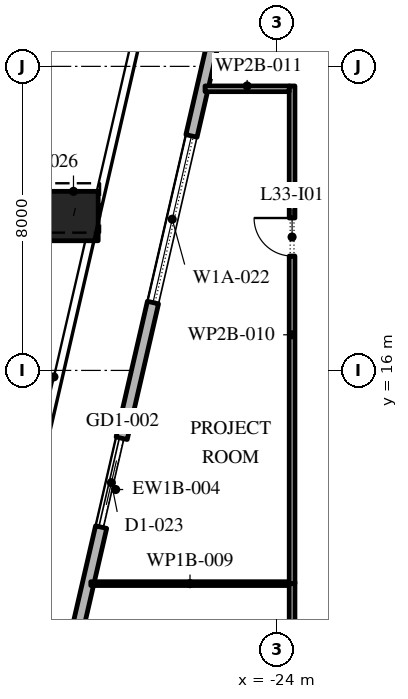
"""IFC4 building model, lengths in metres.
Left out: names, types, materials, properties, quantities, classifications, styles, units other than length and angle.
Written with IfcOpenShell. Run it as: python <this file> out.ifc"""

import sys

from ifc_helpers import new_model, si_unit, direction, frame, frame_2d, origin, origin_2d, place, context, subcontext, project, spatial, rectangle, extrude, element, fill, save


model = new_model("IFC4")
c1 = context("Model", 3, precision=1e-05, world=origin(), true_north=direction((0.0, 1.0)))
c2 = subcontext(c1, "Body", "Model", "MODEL_VIEW")
j1 = project(units=[si_unit("LENGTHUNIT", "METRE"), si_unit("PLANEANGLEUNIT", "RADIAN")], contexts=[c1])
p1 = place(None, origin())
s1 = spatial("IfcSite", under=j1, at=p1, CompositionType="ELEMENT")
p2 = place(p1, origin())
s2 = spatial("IfcBuilding", under=s1, at=p2, CompositionType="ELEMENT")
p3 = place(p2, frame((0.0, 0.0, 151.8)))
s3 = spatial("IfcBuildingStorey", under=s2, at=p3, CompositionType="ELEMENT", Elevation=151.8)
p4 = place(p3, frame((-29.352, 20.062, 0.0), z_axis=(0.011668301382, 0.050504588071, 0.998655665045), x_axis=(-0.974334539389, 0.225104876342, 0.0)))
e1 = element("IfcColumn", 1, at=p4, inside=s3, PredefinedType="COLUMN", context=c2, shape_type="SweptSolid", body=[
    extrude(rectangle(XDim=1.3, YDim=1.3, at=origin_2d()), origin(), (0.0, 0.0, 1.0), 4.206),
])
p5 = place(p3, frame((-22.82, 37.016, 0.0), z_axis=(0.0, 0.0, 1.0), x_axis=(-0.224953880882, -0.974369412223, 0.0)))
e2 = element("IfcWall", 2, at=p5, inside=s3, PredefinedType="STANDARD", context=c2, shape_type="SweptSolid", body=[
    extrude(rectangle(XDim=49.5, YDim=0.3, at=frame_2d((24.75, 0.0))), origin(), (0.0, 0.0, 1.0), 3.95),
])
p6 = place(p5, frame((1.157, 0.0, 0.45)))
e3 = element("IfcOpeningElement", 3, at=p6, cuts=e2, PredefinedType="OPENING", context=c2, shape_type="SweptSolid", body=[
    extrude(rectangle(XDim=4.5, YDim=3.05, at=frame_2d((2.25, 1.525))), frame((0.0, 0.16, 0.0), z_axis=(0.0, -1.0, 0.0), x_axis=(1.0, 0.0, 0.0)), (0.0, 0.0, 1.0), 0.32),
])
p7 = place(p5, frame((8.121, 0.0, 0.45)))
e4 = element("IfcOpeningElement", 4, at=p7, cuts=e2, PredefinedType="OPENING", context=c2, shape_type="SweptSolid", body=[
    extrude(rectangle(XDim=4.5, YDim=3.0, at=frame_2d((2.25, 1.5))), frame((0.0, 0.16, 0.0), z_axis=(0.0, -1.0, 0.0), x_axis=(1.0, 0.0, 0.0)), (0.0, 0.0, 1.0), 0.32),
])
p8 = place(p5, frame((15.236, 0.0, 0.45)))
e5 = element("IfcOpeningElement", 5, at=p8, cuts=e2, PredefinedType="OPENING", context=c2, shape_type="SweptSolid", body=[
    extrude(rectangle(XDim=4.5, YDim=3.0, at=frame_2d((2.25, 1.5))), frame((0.0, 0.16, 0.0), z_axis=(0.0, -1.0, 0.0), x_axis=(1.0, 0.0, 0.0)), (0.0, 0.0, 1.0), 0.32),
])
p9 = place(p5, frame((23.4, 0.0, 0.0)))
e6 = element("IfcOpeningElement", 6, at=p9, cuts=e2, PredefinedType="OPENING", context=c2, shape_type="SweptSolid", body=[
    extrude(rectangle(XDim=2.4, YDim=3.5, at=frame_2d((1.2, 1.75))), frame((0.0, 0.16, 0.0), z_axis=(0.0, -1.0, 0.0), x_axis=(1.0, 0.0, 0.0)), (0.0, 0.0, 1.0), 0.32),
])
p10 = place(p5, frame((29.464, 0.0, 0.45)))
e7 = element("IfcOpeningElement", 7, at=p10, cuts=e2, PredefinedType="OPENING", context=c2, shape_type="SweptSolid", body=[
    extrude(rectangle(XDim=4.5, YDim=2.825, at=frame_2d((2.25, 1.413))), frame((0.0, 0.16, 0.0), z_axis=(0.0, -1.0, 0.0), x_axis=(1.0, 0.0, 0.0)), (0.0, 0.0, 1.0), 0.32),
])
p11 = place(p5, frame((36.579, 0.0, 0.45)))
e8 = element("IfcOpeningElement", 8, at=p11, cuts=e2, PredefinedType="OPENING", context=c2, shape_type="SweptSolid", body=[
    extrude(rectangle(XDim=4.5, YDim=2.625, at=frame_2d((2.25, 1.312))), frame((0.0, 0.16, 0.0), z_axis=(0.0, -1.0, 0.0), x_axis=(1.0, 0.0, 0.0)), (0.0, 0.0, 1.0), 0.32),
])
p12 = place(p5, frame((43.693, 0.0, 0.45)))
e9 = element("IfcOpeningElement", 9, at=p12, cuts=e2, PredefinedType="OPENING", context=c2, shape_type="SweptSolid", body=[
    extrude(rectangle(XDim=4.5, YDim=3.05, at=frame_2d((2.25, 1.525))), frame((0.0, 0.16, 0.0), z_axis=(0.0, -1.0, 0.0), x_axis=(1.0, 0.0, 0.0)), (0.0, 0.0, 1.0), 0.32),
])
p13 = place(p3, frame((-23.6, -4.245, 0.0), z_axis=(0.0, 0.0, 1.0), x_axis=(0.0, 1.0, 0.0)))
e10 = element("IfcWall", 10, at=p13, inside=s3, PredefinedType="PARTITIONING", context=c2, shape_type="SweptSolid", body=[
    extrude(rectangle(XDim=14.685, YDim=0.15, at=frame_2d((7.343, 0.0))), origin(), (0.0, 0.0, 1.0), 3.95),
])
p14 = place(p13, frame((3.735, 0.0, 0.0)))
e11 = element("IfcOpeningElement", 11, at=p14, cuts=e10, PredefinedType="OPENING", context=c2, shape_type="SweptSolid", body=[
    extrude(rectangle(XDim=1.0, YDim=2.1, at=frame_2d((0.5, 1.05))), frame((0.0, 0.085, 0.0), z_axis=(0.0, -1.0, 0.0), x_axis=(1.0, 0.0, 0.0)), (0.0, 0.0, 1.0), 0.17),
])
p15 = place(p3, frame((-23.675, 10.39, 0.0), z_axis=(0.0, 0.0, 1.0), x_axis=(-1.0, 0.0, 0.0)))
e12 = element("IfcWall", 12, at=p15, inside=s3, PredefinedType="PARTITIONING", context=c2, shape_type="SweptSolid", body=[
    extrude(rectangle(XDim=5.221, YDim=0.1, at=frame_2d((2.61, 0.0))), origin(), (0.0, 0.0, 1.0), 3.95),
])
p16 = place(p3, frame((-23.6, 10.39, 0.0), z_axis=(0.0, 0.0, 1.0), x_axis=(0.0, 1.0, 0.0)))
e13 = element("IfcWall", 13, at=p16, inside=s3, PredefinedType="PARTITIONING", context=c2, shape_type="SweptSolid", body=[
    extrude(rectangle(XDim=13.095, YDim=0.15, at=frame_2d((6.548, 0.0))), origin(), (0.0, 0.0, 1.0), 3.95),
])
p17 = place(p16, frame((8.62, 0.0, 0.0)))
e14 = element("IfcOpeningElement", 14, at=p17, cuts=e13, PredefinedType="OPENING", context=c2, shape_type="SweptSolid", body=[
    extrude(rectangle(XDim=1.0, YDim=2.1, at=frame_2d((0.5, 1.05))), frame((0.0, 0.085, 0.0), z_axis=(0.0, -1.0, 0.0), x_axis=(1.0, 0.0, 0.0)), (0.0, 0.0, 1.0), 0.17),
])
p18 = place(p3, frame((-23.675, 23.41, 0.0), z_axis=(0.0, 0.0, 1.0), x_axis=(-1.0, 0.0, 0.0)))
e15 = element("IfcWall", 15, at=p18, inside=s3, PredefinedType="PARTITIONING", context=c2, shape_type="SweptSolid", body=[
    extrude(rectangle(XDim=2.215, YDim=0.15, at=frame_2d((1.107, 0.0))), origin(), (0.0, 0.0, 1.0), 3.95),
])
p19 = place(p8, origin())
e16 = element("IfcWindow", 16, at=p19, inside=s3, PartitioningType="DOUBLE_PANEL_VERTICAL", PredefinedType="WINDOW", context=c2, shape_type="SweptSolid", body=[
    extrude(rectangle(XDim=4.5, YDim=3.0, at=frame_2d((2.25, 1.5))), frame((0.0, 0.03, 0.0), z_axis=(0.0, -1.0, 0.0), x_axis=(1.0, 0.0, 0.0)), (0.0, 0.0, 1.0), 0.06),
])
fill(e5, e16)
p20 = place(p9, origin())
e17 = element("IfcDoor", 17, at=p20, inside=s3, OperationType="DOUBLE_DOOR_SLIDING", PredefinedType="DOOR", context=c2, shape_type="SweptSolid", body=[
    extrude(rectangle(XDim=2.4, YDim=3.5, at=frame_2d((1.2, 1.75))), frame((0.0, 0.025, 0.0), z_axis=(0.0, -1.0, 0.0), x_axis=(1.0, 0.0, 0.0)), (0.0, 0.0, 1.0), 0.05),
])
fill(e6, e17)
p21 = place(p17, origin())
e18 = element("IfcDoor", 18, at=p21, inside=s3, OperationType="SINGLE_SWING_LEFT", PredefinedType="DOOR", context=c2, shape_type="SweptSolid", body=[
    extrude(rectangle(XDim=1.0, YDim=2.1, at=frame_2d((0.5, 1.05))), frame((0.0, 0.025, 0.0), z_axis=(0.0, -1.0, 0.0), x_axis=(1.0, 0.0, 0.0)), (0.0, 0.0, 1.0), 0.05),
])
fill(e14, e18)
save(model, sys.argv[1])
